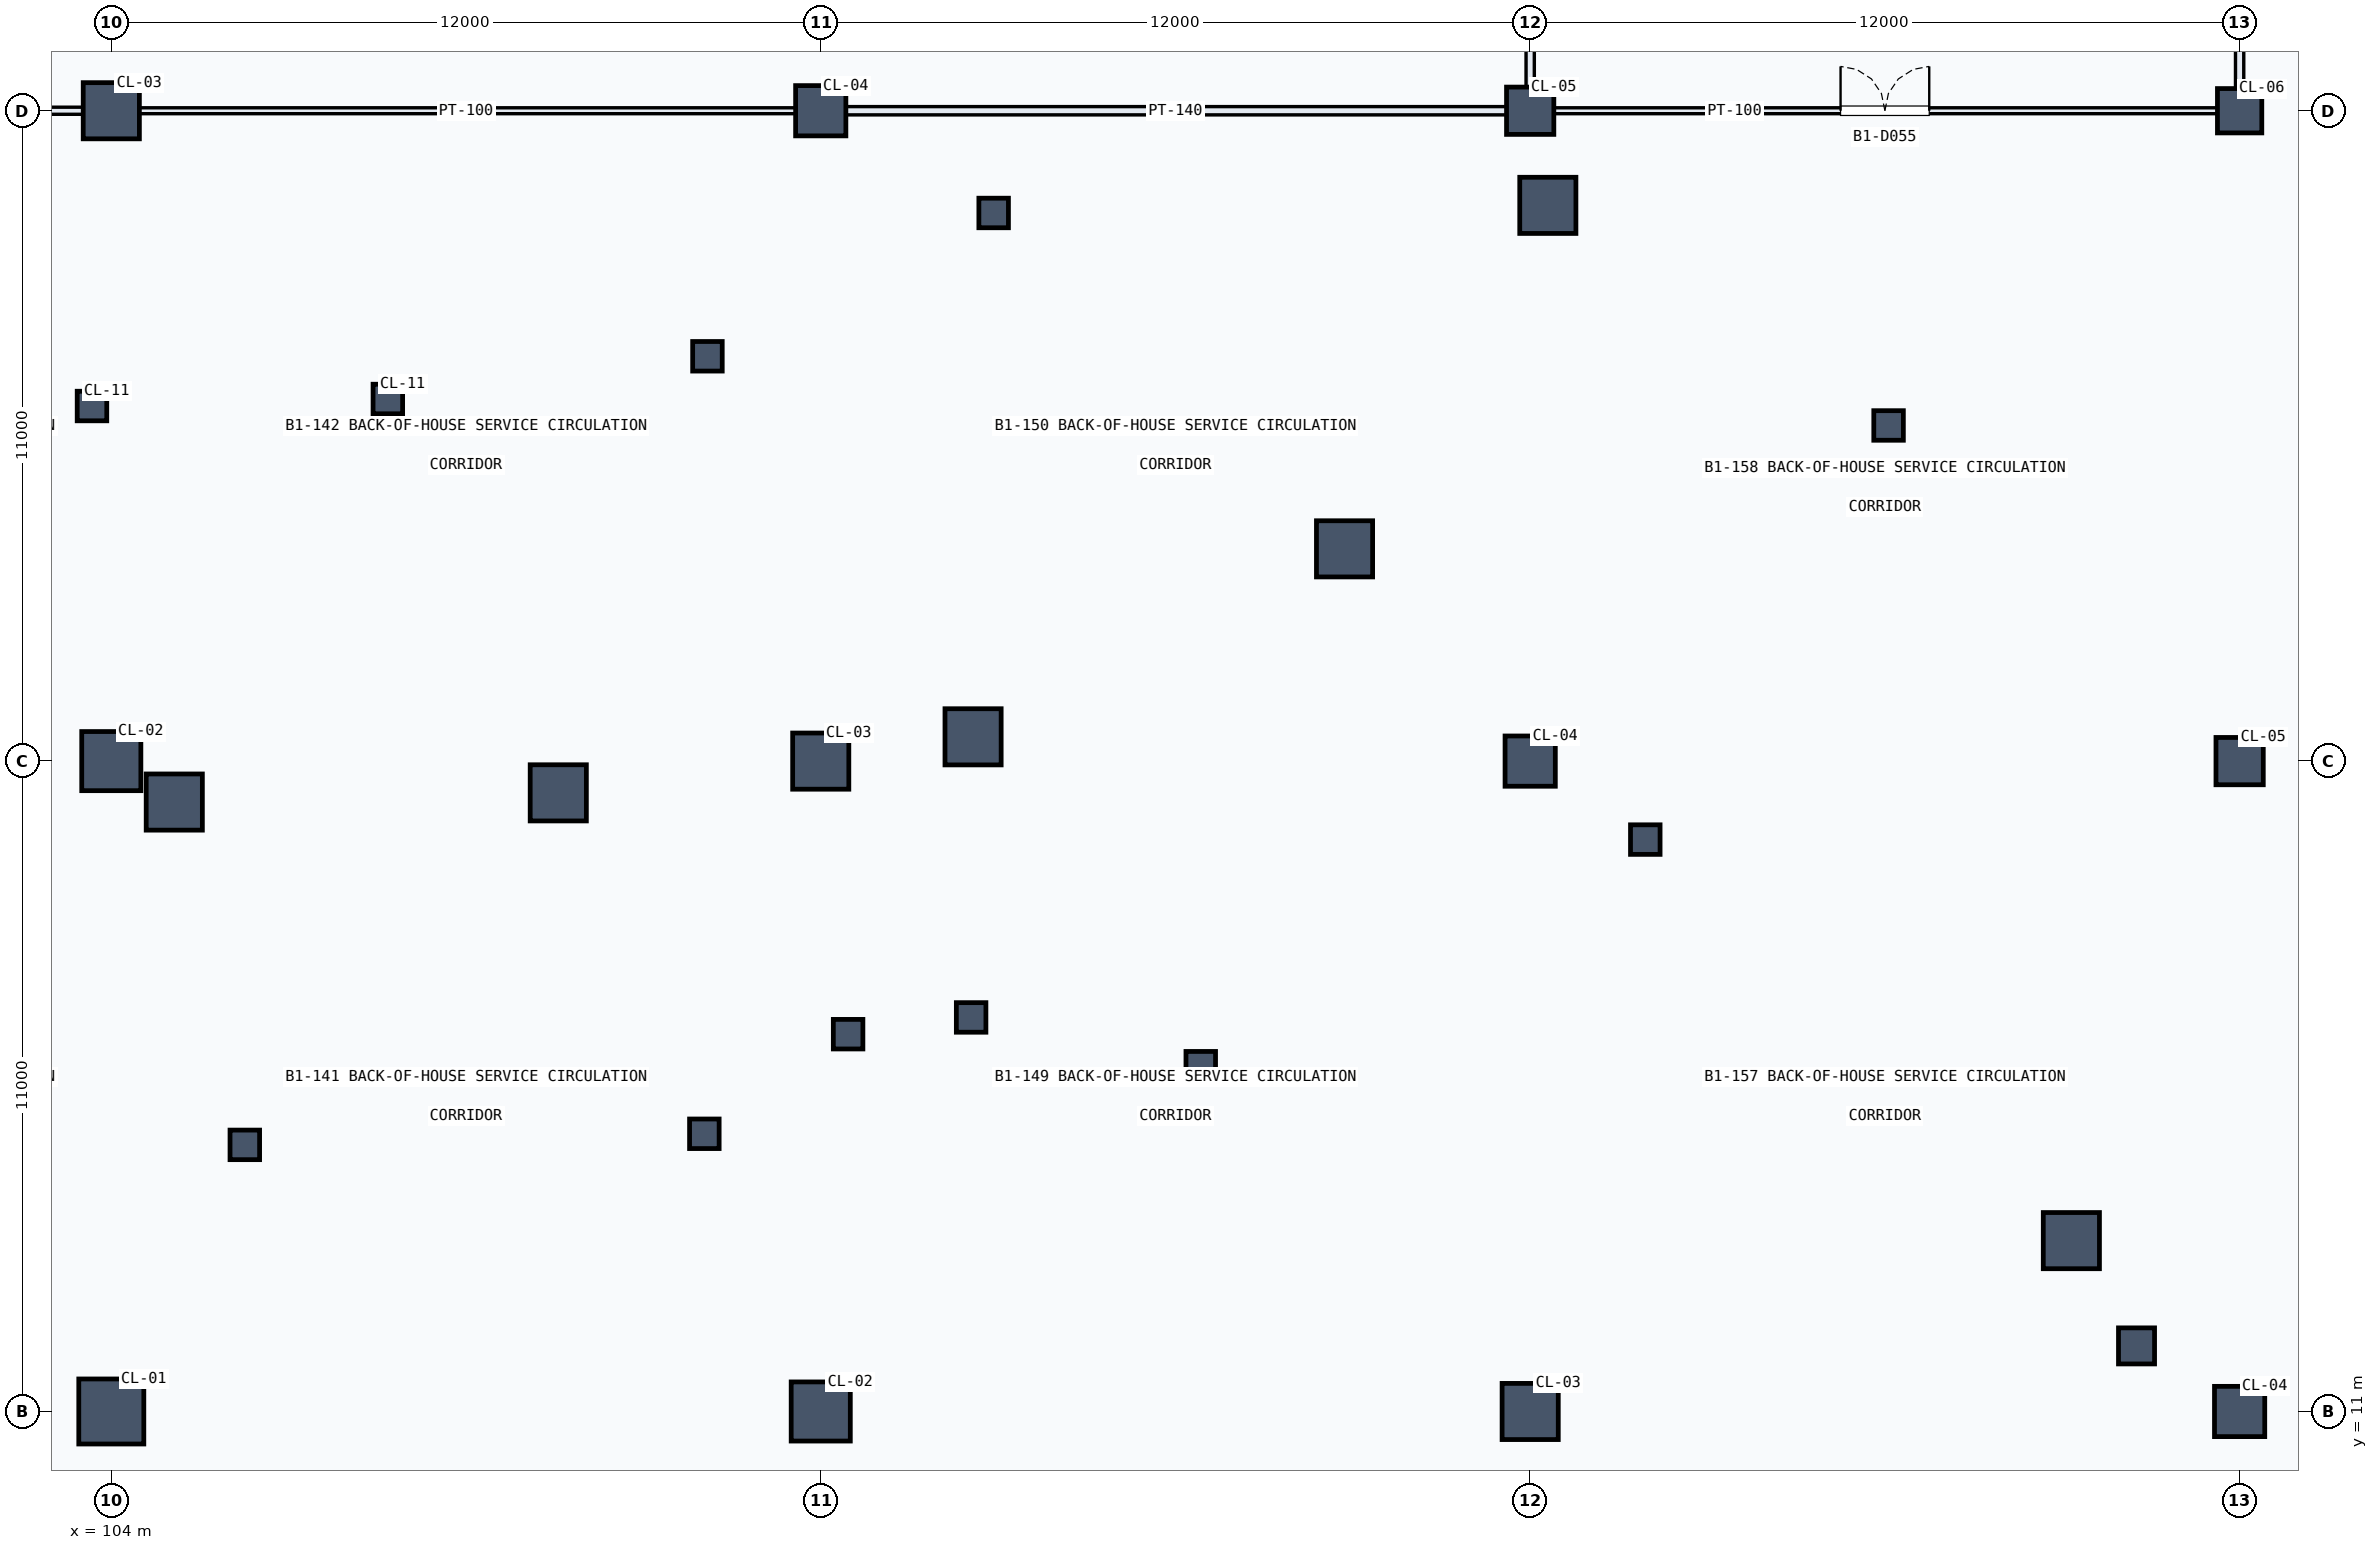
"""IFC4 building model, lengths in metres.
Left out: names, types, materials, properties, quantities, classifications, styles, units other than length and angle.
Written with IfcOpenShell. Run it as: python <this file> out.ifc"""

import sys

from ifc_helpers import new_model, si_unit, direction, frame, frame_2d, origin, origin_2d, place, context, subcontext, project, spatial, rectangle, hollow_circle, extrude, element, fill, save


model = new_model("IFC4")
c1 = context("Model", 3, precision=1e-05, world=origin(), true_north=direction((0.0, 1.0)))
c2 = subcontext(c1, "Body", "Model", "MODEL_VIEW")
j1 = project(units=[si_unit("LENGTHUNIT", "METRE"), si_unit("PLANEANGLEUNIT", "RADIAN")], contexts=[c1])
p1 = place(None, origin())
s1 = spatial("IfcSite", under=j1, at=p1, CompositionType="ELEMENT")
p2 = place(p1, origin())
s2 = spatial("IfcBuilding", under=s1, at=p2, CompositionType="ELEMENT")
p3 = place(p2, frame((0.0, 0.0, -5.4)))
s3 = spatial("IfcBuildingStorey", under=s2, at=p3, CompositionType="ELEMENT", Elevation=-5.4)
p4 = place(p3, frame((104.0, 11.0, 0.0), z_axis=(0.0, 0.0, 1.0), x_axis=(1.0, 0.0, 0.0)))
e1 = element("IfcColumn", 1, at=p4, inside=s3, PredefinedType="COLUMN", context=c2, shape_type="SweptSolid", body=[
    extrude(rectangle(XDim=1.1, YDim=1.1, at=origin_2d()), origin(), (0.0, 0.0, 1.0), 5.4),
])
p5 = place(p3, frame((104.0, 22.0, 0.0), z_axis=(0.0, 0.0, 1.0), x_axis=(1.0, 0.0, 0.0)))
e2 = element("IfcColumn", 2, at=p5, inside=s3, PredefinedType="COLUMN", context=c2, shape_type="SweptSolid", body=[
    extrude(rectangle(XDim=1.0, YDim=1.0, at=origin_2d()), origin(), (0.0, 0.0, 1.0), 5.4),
])
p6 = place(p3, frame((104.0, 33.0, 0.0), z_axis=(0.0, 0.0, 1.0), x_axis=(1.0, 0.0, 0.0)))
e3 = element("IfcColumn", 3, at=p6, inside=s3, PredefinedType="COLUMN", context=c2, shape_type="SweptSolid", body=[
    extrude(rectangle(XDim=0.95, YDim=0.95, at=origin_2d()), origin(), (0.0, 0.0, 1.0), 5.4),
])
p7 = place(p3, frame((116.0, 11.0, 0.0), z_axis=(0.0, 0.0, 1.0), x_axis=(1.0, 0.0, 0.0)))
e4 = element("IfcColumn", 4, at=p7, inside=s3, PredefinedType="COLUMN", context=c2, shape_type="SweptSolid", body=[
    extrude(rectangle(XDim=1.0, YDim=1.0, at=origin_2d()), origin(), (0.0, 0.0, 1.0), 5.4),
])
p8 = place(p3, frame((116.0, 22.0, 0.0), z_axis=(0.0, 0.0, 1.0), x_axis=(1.0, 0.0, 0.0)))
e5 = element("IfcColumn", 5, at=p8, inside=s3, PredefinedType="COLUMN", context=c2, shape_type="SweptSolid", body=[
    extrude(rectangle(XDim=0.95, YDim=0.95, at=origin_2d()), origin(), (0.0, 0.0, 1.0), 5.4),
])
p9 = place(p3, frame((116.0, 33.0, 0.0), z_axis=(0.0, 0.0, 1.0), x_axis=(1.0, 0.0, 0.0)))
e6 = element("IfcColumn", 6, at=p9, inside=s3, PredefinedType="COLUMN", context=c2, shape_type="SweptSolid", body=[
    extrude(rectangle(XDim=0.85, YDim=0.85, at=origin_2d()), origin(), (0.0, 0.0, 1.0), 5.4),
])
p10 = place(p3, frame((128.0, 11.0, 0.0), z_axis=(0.0, 0.0, 1.0), x_axis=(1.0, 0.0, 0.0)))
e7 = element("IfcColumn", 7, at=p10, inside=s3, PredefinedType="COLUMN", context=c2, shape_type="SweptSolid", body=[
    extrude(rectangle(XDim=0.95, YDim=0.95, at=origin_2d()), origin(), (0.0, 0.0, 1.0), 5.4),
])
p11 = place(p3, frame((128.0, 22.0, 0.0), z_axis=(0.0, 0.0, 1.0), x_axis=(1.0, 0.0, 0.0)))
e8 = element("IfcColumn", 8, at=p11, inside=s3, PredefinedType="COLUMN", context=c2, shape_type="SweptSolid", body=[
    extrude(rectangle(XDim=0.85, YDim=0.85, at=origin_2d()), origin(), (0.0, 0.0, 1.0), 5.4),
])
p12 = place(p3, frame((128.0, 33.0, 0.0), z_axis=(0.0, 0.0, 1.0), x_axis=(1.0, 0.0, 0.0)))
e9 = element("IfcColumn", 9, at=p12, inside=s3, PredefinedType="COLUMN", context=c2, shape_type="SweptSolid", body=[
    extrude(rectangle(XDim=0.8, YDim=0.8, at=origin_2d()), origin(), (0.0, 0.0, 1.0), 5.4),
])
p13 = place(p3, frame((140.0, 11.0, 0.0), z_axis=(0.0, 0.0, 1.0), x_axis=(1.0, 0.0, 0.0)))
e10 = element("IfcColumn", 10, at=p13, inside=s3, PredefinedType="COLUMN", context=c2, shape_type="SweptSolid", body=[
    extrude(rectangle(XDim=0.85, YDim=0.85, at=origin_2d()), origin(), (0.0, 0.0, 1.0), 5.4),
])
p14 = place(p3, frame((140.0, 22.0, 0.0), z_axis=(0.0, 0.0, 1.0), x_axis=(1.0, 0.0, 0.0)))
e11 = element("IfcColumn", 11, at=p14, inside=s3, PredefinedType="COLUMN", context=c2, shape_type="SweptSolid", body=[
    extrude(rectangle(XDim=0.8, YDim=0.8, at=origin_2d()), origin(), (0.0, 0.0, 1.0), 5.4),
])
p15 = place(p3, frame((140.0, 33.0, 0.0), z_axis=(0.0, 0.0, 1.0), x_axis=(1.0, 0.0, 0.0)))
e12 = element("IfcColumn", 12, at=p15, inside=s3, PredefinedType="COLUMN", context=c2, shape_type="SweptSolid", body=[
    extrude(rectangle(XDim=0.75, YDim=0.75, at=origin_2d()), origin(), (0.0, 0.0, 1.0), 5.4),
])
p16 = place(p3, frame((138.256, 12.109, 0.0), z_axis=(0.0, 0.0, 1.0), x_axis=(1.0, 0.0, 0.0)))
e13 = element("IfcColumn", 13, at=p16, inside=s3, PredefinedType="COLUMN", context=c2, shape_type="SweptSolid", body=[
    extrude(hollow_circle(Radius=0.305, WallThickness=0.025, at=origin_2d()), origin(), (0.0, 0.0, 1.0), 5.4),
])
for number, where, z_axis, x_axis in (
    (14, (103.673, 28.006, 0.0), (0.0, 0.0, 1.0), (1.0, 0.0, 0.0)),
    (15, (108.678, 28.125, 0.0), (0.0, 0.0, 1.0), (1.0, 0.0, 0.0)),
    (16, (114.083, 28.847, 0.0), (0.0, 0.0, 1.0), (1.0, 0.0, 0.0)),
    (17, (118.925, 31.271, 0.0), (0.0, 0.0, 1.0), (1.0, 0.0, 0.0)),
    (18, (106.258, 15.509, 0.0), (0.0, 0.0, 1.0), (1.0, 0.0, 0.0)),
    (19, (114.031, 15.697, 0.0), (0.0, 0.0, 1.0), (1.0, 0.0, 0.0)),
    (20, (122.428, 16.839, 0.0), (0.0, 0.0, 1.0), (1.0, 0.0, 0.0)),
    (21, (129.947, 20.673, 0.0), (0.0, 0.0, 1.0), (1.0, 0.0, 0.0)),
    (22, (134.062, 27.677, 0.0), (0.0, 0.0, 1.0), (1.0, 0.0, 0.0)),
):
    element("IfcColumn", number, at=place(p3, frame(where, z_axis=z_axis, x_axis=x_axis)), inside=s3, PredefinedType="COLUMN", context=c2, shape_type="SweptSolid", body=[
        extrude(rectangle(XDim=0.5, YDim=0.5, at=origin_2d()), origin(), (0.0, 0.0, 1.0), 5.4),
    ])
for number, where, z_axis, x_axis in (
    (23, (105.065, 21.308, 0.0), (0.0, 0.0, 1.0), (1.0, 0.0, 0.0)),
    (24, (111.56, 21.463, 0.0), (0.0, 0.0, 1.0), (1.0, 0.0, 0.0)),
    (25, (118.577, 22.411, 0.0), (0.0, 0.0, 1.0), (1.0, 0.0, 0.0)),
    (26, (124.86, 25.59, 0.0), (0.0, 0.0, 1.0), (1.0, 0.0, 0.0)),
    (27, (128.299, 31.4, 0.0), (0.0, 0.0, 1.0), (1.0, 0.0, 0.0)),
    (28, (137.154, 13.89, 0.0), (0.0, 0.0, 1.0), (1.0, 0.0, 0.0)),
):
    element("IfcColumn", number, at=place(p3, frame(where, z_axis=z_axis, x_axis=x_axis)), inside=s3, PredefinedType="COLUMN", context=c2, shape_type="SweptSolid", body=[
        extrude(rectangle(XDim=0.95, YDim=0.95, at=origin_2d()), origin(), (0.0, 0.0, 1.0), 5.4),
    ])
for number, where, z_axis, x_axis in (
    (29, (116.463, 17.382, 0.0), (0.0, 0.0, 1.0), (1.0, 0.0, 0.0)),
    (30, (118.544, 17.665, 0.0), (0.0, 0.0, 1.0), (1.0, 0.0, 0.0)),
):
    element("IfcColumn", number, at=place(p3, frame(where, z_axis=z_axis, x_axis=x_axis)), inside=s3, PredefinedType="COLUMN", context=c2, shape_type="SweptSolid", body=[
        extrude(rectangle(XDim=0.5, YDim=0.5, at=origin_2d()), origin(), (0.0, 0.0, 1.0), 5.4),
    ])
p17 = place(p3, frame((94.22, 33.0, 0.0), z_axis=(0.0, 0.0, 1.0), x_axis=(1.0, 0.0, 0.0)))
e31 = element("IfcWall", 31, at=p17, inside=s3, PredefinedType="PARTITIONING", context=c2, shape_type="SweptSolid", body=[
    extrude(rectangle(XDim=9.56, YDim=0.12, at=frame_2d((4.78, 0.0))), origin(), (0.0, 0.0, 1.0), 4.23),
])
p18 = place(p3, frame((104.22, 33.0, 0.0), z_axis=(0.0, 0.0, 1.0), x_axis=(1.0, 0.0, 0.0)))
e32 = element("IfcWall", 32, at=p18, inside=s3, PredefinedType="PARTITIONING", context=c2, shape_type="SweptSolid", body=[
    extrude(rectangle(XDim=11.56, YDim=0.1, at=frame_2d((5.78, 0.0))), origin(), (0.0, 0.0, 1.0), 4.418),
])
p19 = place(p3, frame((116.22, 33.0, 0.0), z_axis=(0.0, 0.0, 1.0), x_axis=(1.0, 0.0, 0.0)))
e33 = element("IfcWall", 33, at=p19, inside=s3, PredefinedType="PARTITIONING", context=c2, shape_type="SweptSolid", body=[
    extrude(rectangle(XDim=11.56, YDim=0.14, at=frame_2d((5.78, 0.0))), origin(), (0.0, 0.0, 1.0), 4.418),
])
p20 = place(p3, frame((128.22, 33.0, 0.0), z_axis=(0.0, 0.0, 1.0), x_axis=(1.0, 0.0, 0.0)))
e34 = element("IfcWall", 34, at=p20, inside=s3, PredefinedType="PARTITIONING", context=c2, shape_type="SweptSolid", body=[
    extrude(rectangle(XDim=11.56, YDim=0.1, at=frame_2d((5.78, 0.0))), origin(), (0.0, 0.0, 1.0), 4.23),
])
p21 = place(p20, frame((5.03, 0.0, 0.0)))
e35 = element("IfcOpeningElement", 35, at=p21, cuts=e34, PredefinedType="OPENING", context=c2, shape_type="SweptSolid", body=[
    extrude(rectangle(XDim=1.5, YDim=2.3, at=frame_2d((0.75, 1.15))), frame((0.0, 0.06, 0.0), z_axis=(0.0, -1.0, 0.0), x_axis=(1.0, 0.0, 0.0)), (0.0, 0.0, 1.0), 0.12),
])
p22 = place(p3, frame((140.0, 33.22, 0.0), z_axis=(0.0, 0.0, 1.0), x_axis=(0.0, 1.0, 0.0)))
e36 = element("IfcWall", 36, at=p22, inside=s3, PredefinedType="PARTITIONING", context=c2, shape_type="SweptSolid", body=[
    extrude(rectangle(XDim=10.56, YDim=0.14, at=frame_2d((5.28, 0.0))), origin(), (0.0, 0.0, 1.0), 4.23),
])
p23 = place(p3, frame((128.0, 33.22, 0.0), z_axis=(0.0, 0.0, 1.0), x_axis=(0.0, 1.0, 0.0)))
e37 = element("IfcWall", 37, at=p23, inside=s3, PredefinedType="PARTITIONING", context=c2, shape_type="SweptSolid", body=[
    extrude(rectangle(XDim=10.56, YDim=0.14, at=frame_2d((5.28, 0.0))), origin(), (0.0, 0.0, 1.0), 4.41),
])
p24 = place(p21, origin())
e38 = element("IfcDoor", 38, at=p24, inside=s3, OperationType="DOUBLE_DOOR_SINGLE_SWING", PredefinedType="DOOR", context=c2, shape_type="SweptSolid", body=[
    extrude(rectangle(XDim=1.5, YDim=2.3, at=frame_2d((0.75, 1.15))), frame((0.0, 0.025, 0.0), z_axis=(0.0, -1.0, 0.0), x_axis=(1.0, 0.0, 0.0)), (0.0, 0.0, 1.0), 0.05),
])
fill(e35, e38)
save(model, sys.argv[1])
